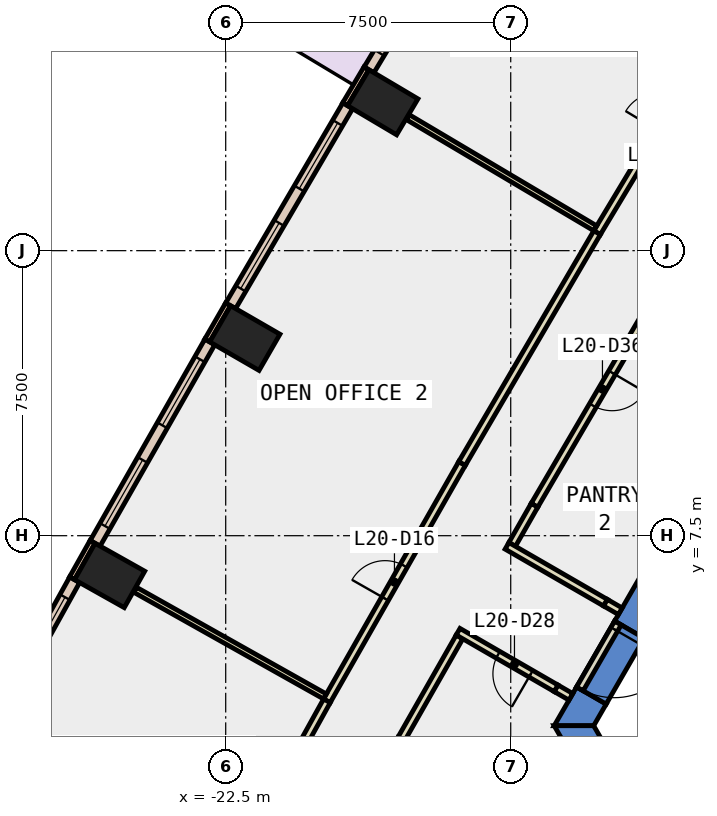
"""IFC4 building model, lengths in metres.
Left out: names, types, materials, properties, quantities, classifications, styles, units other than length and angle.
Written with IfcOpenShell. Run it as: python <this file> out.ifc"""

import sys

from ifc_helpers import new_model, si_unit, direction, frame, frame_2d, origin, origin_2d, place, context, subcontext, project, spatial, polyline, rectangle, outline, extrude, element, fill, save


model = new_model("IFC4")
c1 = context("Model", 3, precision=1e-05, world=origin(), true_north=direction((0.0, 1.0)))
c2 = subcontext(c1, "Body", "Model", "MODEL_VIEW")
j1 = project(units=[si_unit("LENGTHUNIT", "METRE"), si_unit("PLANEANGLEUNIT", "RADIAN")], contexts=[c1])
p1 = place(None, origin())
s1 = spatial("IfcSite", under=j1, at=p1, CompositionType="ELEMENT")
p2 = place(p1, origin())
s2 = spatial("IfcBuilding", under=s1, at=p2, CompositionType="ELEMENT")
p3 = place(p2, frame((0.0, 0.0, 95.0)))
s3 = spatial("IfcBuildingStorey", under=s2, at=p3, CompositionType="ELEMENT", Elevation=95.0)
for number, where, z_axis, x_axis in (
    (1, (-18.367, 18.904, -0.4), (0.0, 0.0, 1.0), (0.51, 0.86, 0.0)),
    (2, (-21.997, 12.7, -0.4), (0.0, 0.0, 1.0), (0.5, 0.866, 0.0)),
    (3, (-25.554, 6.454, -0.4), (0.0, 0.0, 1.0), (0.49, 0.872, 0.0)),
):
    element("IfcColumn", number, at=place(p3, frame(where, z_axis=z_axis, x_axis=x_axis)), inside=s3, PredefinedType="COLUMN", context=c2, shape_type="SweptSolid", body=[
        extrude(rectangle(XDim=1.1, YDim=1.5, at=origin_2d()), origin(), (0.0, 0.0, 1.0), 4.2),
    ])
p4 = place(p3, frame((0.0, 0.0, -0.4)))
e4 = element("IfcWall", 4, at=p4, inside=s3, PredefinedType="SHEAR", context=c2, shape_type="SweptSolid", body=[
    extrude(outline(polyline([(-12.267, 5.252), (-11.488, 4.802), (-6.409, 13.6), (-6.928, 14.5), (-12.267, 5.252)])), origin(), (0.0, 0.0, 1.0), 4.2),
])
p5 = place(p3, frame((0.0, 0.0, -0.4)))
e5 = element("IfcWall", 5, at=p5, inside=s3, PredefinedType="SHEAR", context=c2, shape_type="SweptSolid", body=[
    extrude(outline(polyline([(-12.488, 3.07), (-13.267, 3.52), (-13.856, 2.5), (-12.817, 2.5), (-12.488, 3.07)])), origin(), (0.0, 0.0, 1.0), 4.2),
])
p6 = place(p3, frame((0.0, 0.0, 3.6)))
e6 = element("IfcWall", 6, at=p6, inside=s3, PredefinedType="SHEAR", context=c2, shape_type="SweptSolid", body=[
    extrude(outline(polyline([(-13.267, 3.52), (-12.488, 3.07), (-11.488, 4.802), (-12.267, 5.252), (-13.267, 3.52)])), origin(), (0.0, 0.0, 1.0), 0.2),
])
p7 = place(p3, frame((0.0, 0.0, -0.4)))
e7 = element("IfcWall", 7, at=p7, inside=s3, PredefinedType="SHEAR", context=c2, shape_type="SweptSolid", body=[
    extrude(outline(polyline([(-13.856, 2.5), (-6.928, -9.5), (-6.409, -8.6), (-12.817, 2.5), (-13.856, 2.5)])), origin(), (0.0, 0.0, 1.0), 4.2),
])
p8 = place(p3, frame((-18.796, 19.798, 0.0), z_axis=(0.0, 0.0, 1.0), x_axis=(-0.510082245696, -0.860125631885, 0.0)))
e8 = element("IfcWall", 8, at=p8, inside=s3, PredefinedType="STANDARD", context=c2, shape_type="SweptSolid", body=[
    extrude(rectangle(XDim=1.1, YDim=0.15, at=frame_2d((0.55, 0.0))), origin(), (0.0, 0.0, 1.0), 3.8),
])
p9 = place(p3, frame((-22.436, 13.589, 0.0), z_axis=(0.0, 0.0, 1.0), x_axis=(-0.499837685251, -0.86611909597, 0.0)))
e9 = element("IfcWall", 9, at=p9, inside=s3, PredefinedType="STANDARD", context=c2, shape_type="SweptSolid", body=[
    extrude(rectangle(XDim=1.1, YDim=0.15, at=frame_2d((0.55, 0.0))), origin(), (0.0, 0.0, 1.0), 3.8),
])
p10 = place(p3, frame((-26.004, 7.338, 0.0), z_axis=(0.0, 0.0, 1.0), x_axis=(-0.490008344094, -0.871717742574, 0.0)))
e10 = element("IfcWall", 10, at=p10, inside=s3, PredefinedType="STANDARD", context=c2, shape_type="SweptSolid", body=[
    extrude(rectangle(XDim=1.1, YDim=0.15, at=frame_2d((0.55, 0.0))), origin(), (0.0, 0.0, 1.0), 3.8),
])
p11 = place(p3, frame((-15.588, 24.984, 0.0), z_axis=(0.0, 0.0, 1.0), x_axis=(-0.515102053092, -0.857128855483, 0.0)))
e11 = element("IfcWall", 11, at=p11, inside=s3, PredefinedType="STANDARD", context=c2, shape_type="SweptSolid", body=[
    extrude(rectangle(XDim=6.098, YDim=0.3, at=frame_2d((3.049, 0.0))), origin(), (0.0, 0.0, 1.0), 3.8),
])
p12 = place(p11, frame((0.525, 0.0, 0.0)))
e12 = element("IfcOpeningElement", 12, at=p12, cuts=e11, PredefinedType="OPENING", context=c2, shape_type="SweptSolid", body=[
    extrude(rectangle(XDim=2.0, YDim=2.4, at=frame_2d((1.0, 1.2))), frame((0.0, 0.16, 0.0), z_axis=(0.0, -1.0, 0.0), x_axis=(1.0, 0.0, 0.0)), (0.0, 0.0, 1.0), 0.32),
])
p13 = place(p11, frame((3.574, 0.0, 0.9)))
e13 = element("IfcOpeningElement", 13, at=p13, cuts=e11, PredefinedType="OPENING", context=c2, shape_type="SweptSolid", body=[
    extrude(rectangle(XDim=2.0, YDim=2.6, at=frame_2d((1.0, 1.3))), frame((0.0, 0.16, 0.0), z_axis=(0.0, -1.0, 0.0), x_axis=(1.0, 0.0, 0.0)), (0.0, 0.0, 1.0), 0.32),
])
p14 = place(p3, frame((-19.289, 18.813, 0.0), z_axis=(0.0, 0.0, 1.0), x_axis=(-0.504998117261, -0.863120444413, 0.0)))
e14 = element("IfcWall", 14, at=p14, inside=s3, PredefinedType="STANDARD", context=c2, shape_type="SweptSolid", body=[
    extrude(rectangle(XDim=6.099, YDim=0.3, at=frame_2d((3.049, 0.0))), origin(), (0.0, 0.0, 1.0), 3.8),
])
p15 = place(p14, frame((0.525, 0.0, 0.9)))
e15 = element("IfcOpeningElement", 15, at=p15, cuts=e14, PredefinedType="OPENING", context=c2, shape_type="SweptSolid", body=[
    extrude(rectangle(XDim=2.0, YDim=2.6, at=frame_2d((1.0, 1.3))), frame((0.0, 0.16, 0.0), z_axis=(0.0, -1.0, 0.0), x_axis=(1.0, 0.0, 0.0)), (0.0, 0.0, 1.0), 0.32),
])
p16 = place(p14, frame((3.574, 0.0, 0.9)))
e16 = element("IfcOpeningElement", 16, at=p16, cuts=e14, PredefinedType="OPENING", context=c2, shape_type="SweptSolid", body=[
    extrude(rectangle(XDim=2.0, YDim=2.6, at=frame_2d((1.0, 1.3))), frame((0.0, 0.16, 0.0), z_axis=(0.0, -1.0, 0.0), x_axis=(1.0, 0.0, 0.0)), (0.0, 0.0, 1.0), 0.32),
])
p17 = place(p3, frame((-22.918, 12.598, 0.0), z_axis=(0.0, 0.0, 1.0), x_axis=(-0.49492259535, -0.868937065967, 0.0)))
e17 = element("IfcWall", 17, at=p17, inside=s3, PredefinedType="STANDARD", context=c2, shape_type="SweptSolid", body=[
    extrude(rectangle(XDim=6.098, YDim=0.3, at=frame_2d((3.049, 0.0))), origin(), (0.0, 0.0, 1.0), 3.8),
])
p18 = place(p17, frame((0.525, 0.0, 0.9)))
e18 = element("IfcOpeningElement", 18, at=p18, cuts=e17, PredefinedType="OPENING", context=c2, shape_type="SweptSolid", body=[
    extrude(rectangle(XDim=2.0, YDim=2.6, at=frame_2d((1.0, 1.3))), frame((0.0, 0.16, 0.0), z_axis=(0.0, -1.0, 0.0), x_axis=(1.0, 0.0, 0.0)), (0.0, 0.0, 1.0), 0.32),
])
p19 = place(p17, frame((3.574, 0.0, 0.9)))
e19 = element("IfcOpeningElement", 19, at=p19, cuts=e17, PredefinedType="OPENING", context=c2, shape_type="SweptSolid", body=[
    extrude(rectangle(XDim=2.0, YDim=2.6, at=frame_2d((1.0, 1.3))), frame((0.0, 0.16, 0.0), z_axis=(0.0, -1.0, 0.0), x_axis=(1.0, 0.0, 0.0)), (0.0, 0.0, 1.0), 0.32),
])
p20 = place(p3, frame((-26.474, 6.341, 0.0), z_axis=(0.0, 0.0, 1.0), x_axis=(-0.484823579315, -0.874611969356, 0.0)))
e20 = element("IfcWall", 20, at=p20, inside=s3, PredefinedType="STANDARD", context=c2, shape_type="SweptSolid", body=[
    extrude(rectangle(XDim=6.099, YDim=0.3, at=frame_2d((3.049, 0.0))), origin(), (0.0, 0.0, 1.0), 3.8),
])
p21 = place(p20, frame((0.525, 0.0, 0.9)))
e21 = element("IfcOpeningElement", 21, at=p21, cuts=e20, PredefinedType="OPENING", context=c2, shape_type="SweptSolid", body=[
    extrude(rectangle(XDim=2.0, YDim=2.6, at=frame_2d((1.0, 1.3))), frame((0.0, 0.16, 0.0), z_axis=(0.0, -1.0, 0.0), x_axis=(1.0, 0.0, 0.0)), (0.0, 0.0, 1.0), 0.32),
])
p22 = place(p20, frame((3.574, 0.0, 0.9)))
e22 = element("IfcOpeningElement", 22, at=p22, cuts=e20, PredefinedType="OPENING", context=c2, shape_type="SweptSolid", body=[
    extrude(rectangle(XDim=2.0, YDim=2.6, at=frame_2d((1.0, 1.3))), frame((0.0, 0.16, 0.0), z_axis=(0.0, -1.0, 0.0), x_axis=(1.0, 0.0, 0.0)), (0.0, 0.0, 1.0), 0.32),
])
p23 = place(p3, frame((-10.797, 14.415, 0.0), z_axis=(0.0, 0.0, 1.0), x_axis=(-0.505008297342, -0.863114488128, 0.0)))
e23 = element("IfcWall", 23, at=p23, inside=s3, PredefinedType="PARTITIONING", context=c2, shape_type="SweptSolid", body=[
    extrude(rectangle(XDim=7.085, YDim=0.2, at=frame_2d((3.542, 0.0))), origin(), (0.0, 0.0, 1.0), 3.8),
])
p24 = place(p23, frame((3.043, 0.0, 0.0)))
e24 = element("IfcOpeningElement", 24, at=p24, cuts=e23, PredefinedType="OPENING", context=c2, shape_type="SweptSolid", body=[
    extrude(rectangle(XDim=1.0, YDim=2.1, at=frame_2d((0.5, 1.05))), frame((0.0, 0.11, 0.0), z_axis=(0.0, -1.0, 0.0), x_axis=(1.0, 0.0, 0.0)), (0.0, 0.0, 1.0), 0.22),
])
p25 = place(p3, frame((-14.375, 8.3, 0.0), z_axis=(0.0, 0.0, 1.0), x_axis=(-0.495074026382, -0.868850797549, 0.0)))
e25 = element("IfcWall", 25, at=p25, inside=s3, PredefinedType="PARTITIONING", context=c2, shape_type="SweptSolid", body=[
    extrude(rectangle(XDim=1.186, YDim=0.2, at=frame_2d((0.593, 0.0))), origin(), (0.0, 0.0, 1.0), 3.8),
])
p26 = place(p3, frame((-15.098, 7.233, 0.0), z_axis=(0.0, 0.0, 1.0), x_axis=(0.866101363304, -0.499868411168, 0.0)))
e26 = element("IfcWall", 26, at=p26, inside=s3, PredefinedType="PARTITIONING", context=c2, shape_type="SweptSolid", body=[
    extrude(rectangle(XDim=2.992, YDim=0.2, at=frame_2d((1.496, 0.0))), origin(), (0.0, 0.0, 1.0), 3.8),
])
p27 = place(p3, frame((-13.417, 3.26, 0.0), z_axis=(0.0, 0.0, 1.0), x_axis=(-0.866032067792, 0.499988457423, 0.0)))
e27 = element("IfcWall", 27, at=p27, inside=s3, PredefinedType="PARTITIONING", context=c2, shape_type="SweptSolid", body=[
    extrude(rectangle(XDim=0.45, YDim=0.2, at=frame_2d((0.225, 0.0))), origin(), (0.0, 0.0, 1.0), 2.4),
])
p28 = place(p3, frame((-16.348, 4.837, 0.0), z_axis=(0.0, 0.0, 1.0), x_axis=(-0.495121026513, -0.868824015037, 0.0)))
e28 = element("IfcWall", 28, at=p28, inside=s3, PredefinedType="PARTITIONING", context=c2, shape_type="SweptSolid", body=[
    extrude(rectangle(XDim=3.101, YDim=0.2, at=frame_2d((1.55, 0.0))), origin(), (0.0, 0.0, 1.0), 3.8),
])
p29 = place(p3, frame((-12.728, 15.473, 0.0), z_axis=(0.0, 0.0, 1.0), x_axis=(0.515010673306, 0.857183764651, 0.0)))
e29 = element("IfcWall", 29, at=p29, inside=s3, PredefinedType="PARTITIONING", context=c2, shape_type="SweptSolid", body=[
    extrude(rectangle(XDim=7.111, YDim=0.2, at=frame_2d((3.555, 0.0))), origin(), (0.0, 0.0, 1.0), 3.8),
])
p30 = place(p29, frame((3.13, 0.0, 0.0)))
e30 = element("IfcOpeningElement", 30, at=p30, cuts=e29, PredefinedType="OPENING", context=c2, shape_type="SweptSolid", body=[
    extrude(rectangle(XDim=1.0, YDim=2.1, at=frame_2d((0.5, 1.05))), frame((0.0, 0.11, 0.0), z_axis=(0.0, -1.0, 0.0), x_axis=(1.0, 0.0, 0.0)), (0.0, 0.0, 1.0), 0.22),
])
p31 = place(p3, frame((-19.838, 3.156, 0.0), z_axis=(0.0, 0.0, 1.0), x_axis=(0.494978648769, 0.868905137091, 0.0)))
e31 = element("IfcWall", 31, at=p31, inside=s3, PredefinedType="PARTITIONING", context=c2, shape_type="SweptSolid", body=[
    extrude(rectangle(XDim=7.186, YDim=0.2, at=frame_2d((3.593, 0.0))), origin(), (0.0, 0.0, 1.0), 3.8),
])
p32 = place(p31, frame((3.093, 0.0, 0.0)))
e32 = element("IfcOpeningElement", 32, at=p32, cuts=e31, PredefinedType="OPENING", context=c2, shape_type="SweptSolid", body=[
    extrude(rectangle(XDim=1.0, YDim=2.1, at=frame_2d((0.5, 1.05))), frame((0.0, 0.11, 0.0), z_axis=(0.0, -1.0, 0.0), x_axis=(1.0, 0.0, 0.0)), (0.0, 0.0, 1.0), 0.22),
])
p33 = place(p3, frame((-16.281, 9.4, 0.0), z_axis=(0.0, 0.0, 1.0), x_axis=(0.504973069247, 0.863135099121, 0.0)))
e33 = element("IfcWall", 33, at=p33, inside=s3, PredefinedType="PARTITIONING", context=c2, shape_type="SweptSolid", body=[
    extrude(rectangle(XDim=7.036, YDim=0.2, at=frame_2d((3.518, 0.0))), origin(), (0.0, 0.0, 1.0), 3.8),
])
p34 = place(p3, frame((-23.284, -3.064, 0.0), z_axis=(0.0, 0.0, 1.0), x_axis=(0.48478560119, 0.874633020689, 0.0)))
e34 = element("IfcWall", 34, at=p34, inside=s3, PredefinedType="PARTITIONING", context=c2, shape_type="SweptSolid", body=[
    extrude(rectangle(XDim=7.11, YDim=0.2, at=frame_2d((3.555, 0.0))), origin(), (0.0, 0.0, 1.0), 3.8),
])
p35 = place(p34, frame((3.13, 0.0, 0.0)))
e35 = element("IfcOpeningElement", 35, at=p35, cuts=e34, PredefinedType="OPENING", context=c2, shape_type="SweptSolid", body=[
    extrude(rectangle(XDim=1.0, YDim=2.1, at=frame_2d((0.5, 1.05))), frame((0.0, 0.11, 0.0), z_axis=(0.0, -1.0, 0.0), x_axis=(1.0, 0.0, 0.0)), (0.0, 0.0, 1.0), 0.22),
])
p36 = place(p3, frame((-12.776, 15.589, 0.0), z_axis=(0.0, 0.0, 1.0), x_axis=(-0.860225086153, 0.509914503768, 0.0)))
e36 = element("IfcWall", 36, at=p36, inside=s3, PredefinedType="PARTITIONING", context=c2, shape_type="SweptSolid", body=[
    extrude(rectangle(XDim=5.73, YDim=0.15, at=frame_2d((2.865, 0.0))), origin(), (0.0, 0.0, 1.0), 3.8),
])
p37 = place(p3, frame((-19.888, 3.27, 0.0), z_axis=(0.0, 0.0, 1.0), x_axis=(-0.871789386467, 0.489880868828, 0.0)))
e37 = element("IfcWall", 37, at=p37, inside=s3, PredefinedType="PARTITIONING", context=c2, shape_type="SweptSolid", body=[
    extrude(rectangle(XDim=5.73, YDim=0.15, at=frame_2d((2.865, 0.0))), origin(), (0.0, 0.0, 1.0), 3.8),
])
p38 = place(p3, frame((-12.18, 5.202, 0.0), z_axis=(0.0, 0.0, 1.0), x_axis=(-0.50002537861, -0.866010750942, 0.0)))
e38 = element("IfcWall", 38, at=p38, inside=s3, PredefinedType="PARTITIONING", context=c2, shape_type="SweptSolid", body=[
    extrude(rectangle(XDim=2.0, YDim=0.2, at=frame_2d((1.0, 0.0))), origin(), (0.0, 0.0, 1.0), 2.4),
])
p39 = place(p38, frame((0.19, 0.0, 0.0)))
e39 = element("IfcOpeningElement", 39, at=p39, cuts=e38, PredefinedType="OPENING", context=c2, shape_type="SweptSolid", body=[
    extrude(rectangle(XDim=1.8, YDim=2.1, at=frame_2d((0.9, 1.05))), frame((0.0, 0.11, 0.0), z_axis=(0.0, -1.0, 0.0), x_axis=(1.0, 0.0, 0.0)), (0.0, 0.0, 1.0), 0.22),
])
p40 = place(p3, frame((-12.506, 5.737, 0.0), z_axis=(0.0, 0.0, 1.0), x_axis=(0.865624510465, -0.500693725627, 0.0)))
e40 = element("IfcWall", 40, at=p40, inside=s3, PredefinedType="PARTITIONING", context=c2, shape_type="SweptSolid", body=[
    extrude(rectangle(XDim=0.449, YDim=0.2, at=frame_2d((0.225, 0.0))), origin(), (0.0, 0.0, 1.0), 2.4),
])
p41 = place(p3, frame((-13.807, 3.485, 0.0), z_axis=(0.0, 0.0, 1.0), x_axis=(-0.865947944451, 0.500134139508, 0.0)))
e41 = element("IfcWall", 41, at=p41, inside=s3, PredefinedType="PARTITIONING", context=c2, shape_type="SweptSolid", body=[
    extrude(rectangle(XDim=2.977, YDim=0.2, at=frame_2d((1.489, 0.0))), origin(), (0.0, 0.0, 1.0), 3.8),
])
p42 = place(p41, frame((0.764, 0.0, 0.0)))
e42 = element("IfcOpeningElement", 42, at=p42, cuts=e41, PredefinedType="OPENING", context=c2, shape_type="SweptSolid", body=[
    extrude(rectangle(XDim=1.0, YDim=2.1, at=frame_2d((0.5, 1.05))), frame((0.0, 0.11, 0.0), z_axis=(0.0, -1.0, 0.0), x_axis=(1.0, 0.0, 0.0)), (0.0, 0.0, 1.0), 0.22),
])
p43 = place(p3, frame((-9.788, 2.853, 0.0), z_axis=(0.0, 0.0, 1.0), x_axis=(-0.865998541277, -0.500046524342, 0.0)))
e43 = element("IfcWall", 43, at=p43, inside=s3, PredefinedType="STANDARD", context=c2, shape_type="SweptSolid", body=[
    extrude(rectangle(XDim=2.5, YDim=0.2, at=frame_2d((1.25, 0.0))), origin(), (0.0, 0.0, 1.0), 3.8),
])
p44 = place(p13, origin())
e44 = element("IfcWindow", 44, at=p44, inside=s3, PartitioningType="SINGLE_PANEL", PredefinedType="WINDOW", context=c2, shape_type="SweptSolid", body=[
    extrude(rectangle(XDim=2.0, YDim=2.6, at=frame_2d((1.0, 1.3))), frame((0.0, 0.03, 0.0), z_axis=(0.0, -1.0, 0.0), x_axis=(1.0, 0.0, 0.0)), (0.0, 0.0, 1.0), 0.06),
])
fill(e13, e44)
p45 = place(p15, origin())
e45 = element("IfcWindow", 45, at=p45, inside=s3, PartitioningType="SINGLE_PANEL", PredefinedType="WINDOW", context=c2, shape_type="SweptSolid", body=[
    extrude(rectangle(XDim=2.0, YDim=2.6, at=frame_2d((1.0, 1.3))), frame((0.0, 0.03, 0.0), z_axis=(0.0, -1.0, 0.0), x_axis=(1.0, 0.0, 0.0)), (0.0, 0.0, 1.0), 0.06),
])
fill(e15, e45)
p46 = place(p16, origin())
e46 = element("IfcWindow", 46, at=p46, inside=s3, PartitioningType="SINGLE_PANEL", PredefinedType="WINDOW", context=c2, shape_type="SweptSolid", body=[
    extrude(rectangle(XDim=2.0, YDim=2.6, at=frame_2d((1.0, 1.3))), frame((0.0, 0.03, 0.0), z_axis=(0.0, -1.0, 0.0), x_axis=(1.0, 0.0, 0.0)), (0.0, 0.0, 1.0), 0.06),
])
fill(e16, e46)
p47 = place(p18, origin())
e47 = element("IfcWindow", 47, at=p47, inside=s3, PartitioningType="SINGLE_PANEL", PredefinedType="WINDOW", context=c2, shape_type="SweptSolid", body=[
    extrude(rectangle(XDim=2.0, YDim=2.6, at=frame_2d((1.0, 1.3))), frame((0.0, 0.03, 0.0), z_axis=(0.0, -1.0, 0.0), x_axis=(1.0, 0.0, 0.0)), (0.0, 0.0, 1.0), 0.06),
])
fill(e18, e47)
p48 = place(p19, origin())
e48 = element("IfcWindow", 48, at=p48, inside=s3, PartitioningType="SINGLE_PANEL", PredefinedType="WINDOW", context=c2, shape_type="SweptSolid", body=[
    extrude(rectangle(XDim=2.0, YDim=2.6, at=frame_2d((1.0, 1.3))), frame((0.0, 0.03, 0.0), z_axis=(0.0, -1.0, 0.0), x_axis=(1.0, 0.0, 0.0)), (0.0, 0.0, 1.0), 0.06),
])
fill(e19, e48)
p49 = place(p21, origin())
e49 = element("IfcWindow", 49, at=p49, inside=s3, PartitioningType="SINGLE_PANEL", PredefinedType="WINDOW", context=c2, shape_type="SweptSolid", body=[
    extrude(rectangle(XDim=2.0, YDim=2.6, at=frame_2d((1.0, 1.3))), frame((0.0, 0.03, 0.0), z_axis=(0.0, -1.0, 0.0), x_axis=(1.0, 0.0, 0.0)), (0.0, 0.0, 1.0), 0.06),
])
fill(e21, e49)
p50 = place(p32, origin())
e50 = element("IfcDoor", 50, at=p50, inside=s3, OperationType="SINGLE_SWING_LEFT", PredefinedType="DOOR", context=c2, shape_type="SweptSolid", body=[
    extrude(rectangle(XDim=1.0, YDim=2.1, at=frame_2d((0.5, 1.05))), frame((0.0, 0.025, 0.0), z_axis=(0.0, -1.0, 0.0), x_axis=(1.0, 0.0, 0.0)), (0.0, 0.0, 1.0), 0.05),
])
fill(e32, e50)
p51 = place(p42, origin())
e51 = element("IfcDoor", 51, at=p51, inside=s3, OperationType="SINGLE_SWING_LEFT", PredefinedType="DOOR", context=c2, shape_type="SweptSolid", body=[
    extrude(rectangle(XDim=1.0, YDim=2.1, at=frame_2d((0.5, 1.05))), frame((0.0, 0.025, 0.0), z_axis=(0.0, -1.0, 0.0), x_axis=(1.0, 0.0, 0.0)), (0.0, 0.0, 1.0), 0.05),
])
fill(e42, e51)
p52 = place(p24, origin())
e52 = element("IfcDoor", 52, at=p52, inside=s3, OperationType="SINGLE_SWING_LEFT", PredefinedType="DOOR", context=c2, shape_type="SweptSolid", body=[
    extrude(rectangle(XDim=1.0, YDim=2.1, at=frame_2d((0.5, 1.05))), frame((0.0, 0.025, 0.0), z_axis=(0.0, -1.0, 0.0), x_axis=(1.0, 0.0, 0.0)), (0.0, 0.0, 1.0), 0.05),
])
fill(e24, e52)
p53 = place(p39, origin())
e53 = element("IfcDoor", 53, at=p53, inside=s3, OperationType="DOUBLE_DOOR_SINGLE_SWING", PredefinedType="DOOR", context=c2, shape_type="SweptSolid", body=[
    extrude(rectangle(XDim=1.8, YDim=2.1, at=frame_2d((0.9, 1.05))), frame((0.0, 0.025, 0.0), z_axis=(0.0, -1.0, 0.0), x_axis=(1.0, 0.0, 0.0)), (0.0, 0.0, 1.0), 0.05),
])
fill(e39, e53)
save(model, sys.argv[1])
